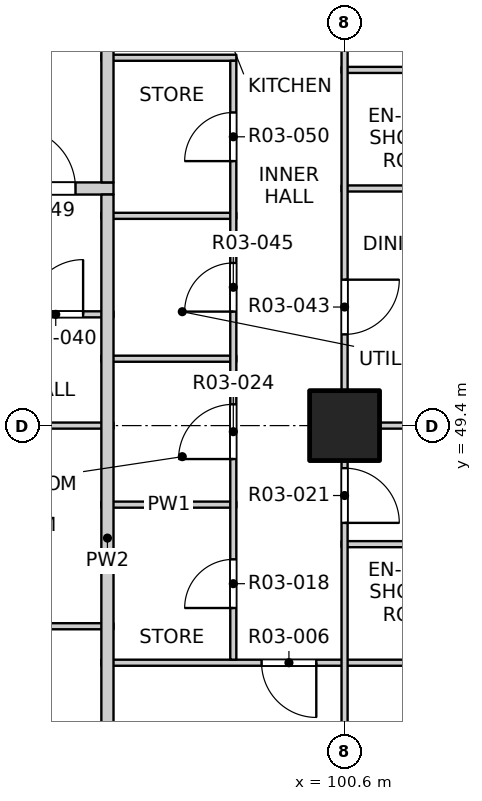
"""IFC4 building model, lengths in metres.
Left out: names, types, materials, properties, quantities, classifications, styles, units other than length and angle.
Written with IfcOpenShell. Run it as: python <this file> out.ifc"""

import sys

from ifc_helpers import new_model, si_unit, direction, frame, frame_2d, origin, origin_2d, place, context, subcontext, project, spatial, rectangle, extrude, element, fill, save


model = new_model("IFC4")
c1 = context("Model", 3, precision=1e-05, world=origin(), true_north=direction((0.0, 1.0)))
c2 = subcontext(c1, "Body", "Model", "MODEL_VIEW")
j1 = project(units=[si_unit("LENGTHUNIT", "METRE"), si_unit("PLANEANGLEUNIT", "RADIAN")], contexts=[c1])
p1 = place(None, origin())
s1 = spatial("IfcSite", under=j1, at=p1, CompositionType="ELEMENT")
p2 = place(p1, origin())
s2 = spatial("IfcBuilding", under=s1, at=p2, CompositionType="ELEMENT")
p3 = place(p2, frame((0.0, 0.0, 43.3)))
s3 = spatial("IfcBuildingStorey", under=s2, at=p3, CompositionType="ELEMENT", Elevation=43.3)
p4 = place(p3, frame((100.6, 49.4, -0.25), z_axis=(0.0, 0.0, 1.0), x_axis=(1.0, 0.0, 0.0)))
e1 = element("IfcColumn", 1, at=p4, inside=s3, PredefinedType="COLUMN", context=c2, shape_type="SweptSolid", body=[
    extrude(rectangle(XDim=1.15, YDim=1.15, at=origin_2d()), origin(), (0.0, 0.0, 1.0), 3.35),
])
p5 = place(p3, frame((96.6, 45.5, 0.0), z_axis=(0.0, 0.0, 1.0), x_axis=(1.0, 0.0, 0.0)))
e2 = element("IfcWall", 2, at=p5, inside=s3, PredefinedType="PARTITIONING", context=c2, shape_type="SweptSolid", body=[
    extrude(rectangle(XDim=11.5, YDim=0.1, at=frame_2d((5.75, 0.0))), origin(), (0.0, 0.0, 1.0), 3.1),
])
p6 = place(p5, frame((2.635, 0.0, 0.0)))
e3 = element("IfcOpeningElement", 3, at=p6, cuts=e2, PredefinedType="OPENING", context=c2, shape_type="SweptSolid", body=[
    extrude(rectangle(XDim=0.9, YDim=2.1, at=frame_2d((0.45, 1.05))), frame((0.0, 0.06, 0.0), z_axis=(0.0, -1.0, 0.0), x_axis=(1.0, 0.0, 0.0)), (0.0, 0.0, 1.0), 0.12),
])
p7 = place(p3, frame((88.8, 46.1, 0.0), z_axis=(0.0, 0.0, 1.0), x_axis=(1.0, 0.0, 0.0)))
e4 = element("IfcWall", 4, at=p7, inside=s3, PredefinedType="PARTITIONING", context=c2, shape_type="SweptSolid", body=[
    extrude(rectangle(XDim=8.0, YDim=0.1, at=frame_2d((4.0, 0.0))), origin(), (0.0, 0.0, 1.0), 3.1),
])
p8 = place(p7, frame((0.625, 0.0, 0.0)))
e5 = element("IfcOpeningElement", 5, at=p8, cuts=e4, PredefinedType="OPENING", context=c2, shape_type="SweptSolid", body=[
    extrude(rectangle(XDim=0.9, YDim=2.1, at=frame_2d((0.45, 1.05))), frame((0.0, 0.06, 0.0), z_axis=(0.0, -1.0, 0.0), x_axis=(1.0, 0.0, 0.0)), (0.0, 0.0, 1.0), 0.12),
])
p9 = place(p7, frame((2.575, 0.0, 0.0)))
e6 = element("IfcOpeningElement", 6, at=p9, cuts=e4, PredefinedType="OPENING", context=c2, shape_type="SweptSolid", body=[
    extrude(rectangle(XDim=0.9, YDim=2.1, at=frame_2d((0.45, 1.05))), frame((0.0, 0.06, 0.0), z_axis=(0.0, -1.0, 0.0), x_axis=(1.0, 0.0, 0.0)), (0.0, 0.0, 1.0), 0.12),
])
p10 = place(p7, frame((5.35, 0.0, 0.0)))
e7 = element("IfcOpeningElement", 7, at=p10, cuts=e4, PredefinedType="OPENING", context=c2, shape_type="SweptSolid", body=[
    extrude(rectangle(XDim=1.2, YDim=2.1, at=frame_2d((0.6, 1.05))), frame((0.0, 0.06, 0.0), z_axis=(0.0, -1.0, 0.0), x_axis=(1.0, 0.0, 0.0)), (0.0, 0.0, 1.0), 0.12),
])
p11 = place(p3, frame((100.55, 47.45, 0.0), z_axis=(0.0, 0.0, 1.0), x_axis=(1.0, 0.0, 0.0)))
e8 = element("IfcWall", 8, at=p11, inside=s3, PredefinedType="PARTITIONING", context=c2, shape_type="SweptSolid", body=[
    extrude(rectangle(XDim=3.55, YDim=0.1, at=frame_2d((1.775, 0.0))), origin(), (0.0, 0.0, 1.0), 3.1),
])
p12 = place(p3, frame((96.6, 48.1, 0.0), z_axis=(0.0, 0.0, 1.0), x_axis=(1.0, 0.0, 0.0)))
e9 = element("IfcWall", 9, at=p12, inside=s3, PredefinedType="PARTITIONING", context=c2, shape_type="SweptSolid", body=[
    extrude(rectangle(XDim=2.22, YDim=0.1, at=frame_2d((1.11, 0.0))), origin(), (0.0, 0.0, 1.0), 3.1),
])
p13 = place(p3, frame((73.2, 49.4, 0.0), z_axis=(0.0, 0.0, 1.0), x_axis=(1.0, 0.0, 0.0)))
e10 = element("IfcWall", 10, at=p13, inside=s3, PredefinedType="PARTITIONING", context=c2, shape_type="SweptSolid", body=[
    extrude(rectangle(XDim=23.6, YDim=0.1, at=frame_2d((11.8, 0.0))), origin(), (0.0, 0.0, 1.0), 3.1),
])
p14 = place(p13, frame((1.6, 0.0, 0.0)))
e11 = element("IfcOpeningElement", 11, at=p14, cuts=e10, PredefinedType="OPENING", context=c2, shape_type="SweptSolid", body=[
    extrude(rectangle(XDim=0.9, YDim=2.1, at=frame_2d((0.45, 1.05))), frame((0.0, 0.06, 0.0), z_axis=(0.0, -1.0, 0.0), x_axis=(1.0, 0.0, 0.0)), (0.0, 0.0, 1.0), 0.12),
])
p15 = place(p13, frame((6.475, 0.0, 0.0)))
e12 = element("IfcOpeningElement", 12, at=p15, cuts=e10, PredefinedType="OPENING", context=c2, shape_type="SweptSolid", body=[
    extrude(rectangle(XDim=0.9, YDim=2.1, at=frame_2d((0.45, 1.05))), frame((0.0, 0.06, 0.0), z_axis=(0.0, -1.0, 0.0), x_axis=(1.0, 0.0, 0.0)), (0.0, 0.0, 1.0), 0.12),
])
p16 = place(p13, frame((9.4, 0.0, 0.0)))
e13 = element("IfcOpeningElement", 13, at=p16, cuts=e10, PredefinedType="OPENING", context=c2, shape_type="SweptSolid", body=[
    extrude(rectangle(XDim=0.9, YDim=2.1, at=frame_2d((0.45, 1.05))), frame((0.0, 0.06, 0.0), z_axis=(0.0, -1.0, 0.0), x_axis=(1.0, 0.0, 0.0)), (0.0, 0.0, 1.0), 0.12),
])
p17 = place(p13, frame((14.275, 0.0, 0.0)))
e14 = element("IfcOpeningElement", 14, at=p17, cuts=e10, PredefinedType="OPENING", context=c2, shape_type="SweptSolid", body=[
    extrude(rectangle(XDim=0.9, YDim=2.1, at=frame_2d((0.45, 1.05))), frame((0.0, 0.06, 0.0), z_axis=(0.0, -1.0, 0.0), x_axis=(1.0, 0.0, 0.0)), (0.0, 0.0, 1.0), 0.12),
])
p18 = place(p13, frame((18.0, 0.0, 0.0)))
e15 = element("IfcOpeningElement", 15, at=p18, cuts=e10, PredefinedType="OPENING", context=c2, shape_type="SweptSolid", body=[
    extrude(rectangle(XDim=0.9, YDim=2.1, at=frame_2d((0.45, 1.05))), frame((0.0, 0.06, 0.0), z_axis=(0.0, -1.0, 0.0), x_axis=(1.0, 0.0, 0.0)), (0.0, 0.0, 1.0), 0.12),
])
p19 = place(p13, frame((21.1, 0.0, 0.0)))
e16 = element("IfcOpeningElement", 16, at=p19, cuts=e10, PredefinedType="OPENING", context=c2, shape_type="SweptSolid", body=[
    extrude(rectangle(XDim=0.9, YDim=2.1, at=frame_2d((0.45, 1.05))), frame((0.0, 0.06, 0.0), z_axis=(0.0, -1.0, 0.0), x_axis=(1.0, 0.0, 0.0)), (0.0, 0.0, 1.0), 0.12),
])
p20 = place(p3, frame((100.55, 49.4, 0.0), z_axis=(0.0, 0.0, 1.0), x_axis=(1.0, 0.0, 0.0)))
e17 = element("IfcWall", 17, at=p20, inside=s3, PredefinedType="PARTITIONING", context=c2, shape_type="SweptSolid", body=[
    extrude(rectangle(XDim=7.55, YDim=0.1, at=frame_2d((3.775, 0.0))), origin(), (0.0, 0.0, 1.0), 3.1),
])
p21 = place(p3, frame((96.6, 50.5, 0.0), z_axis=(0.0, 0.0, 1.0), x_axis=(1.0, 0.0, 0.0)))
e18 = element("IfcWall", 18, at=p21, inside=s3, PredefinedType="PARTITIONING", context=c2, shape_type="SweptSolid", body=[
    extrude(rectangle(XDim=2.22, YDim=0.1, at=frame_2d((1.11, 0.0))), origin(), (0.0, 0.0, 1.0), 3.1),
])
p22 = place(p3, frame((94.95, 51.23, 0.0), z_axis=(0.0, 0.0, 1.0), x_axis=(1.0, 0.0, 0.0)))
e19 = element("IfcWall", 19, at=p22, inside=s3, PredefinedType="PARTITIONING", context=c2, shape_type="SweptSolid", body=[
    extrude(rectangle(XDim=1.85, YDim=0.1, at=frame_2d((0.925, 0.0))), origin(), (0.0, 0.0, 1.0), 3.1),
])
p23 = place(p22, frame((0.45, 0.0, 0.0)))
e20 = element("IfcOpeningElement", 20, at=p23, cuts=e19, PredefinedType="OPENING", context=c2, shape_type="SweptSolid", body=[
    extrude(rectangle(XDim=0.9, YDim=2.1, at=frame_2d((0.45, 1.05))), frame((0.0, 0.06, 0.0), z_axis=(0.0, -1.0, 0.0), x_axis=(1.0, 0.0, 0.0)), (0.0, 0.0, 1.0), 0.12),
])
p24 = place(p3, frame((96.6, 52.85, 0.0), z_axis=(0.0, 0.0, 1.0), x_axis=(1.0, 0.0, 0.0)))
e21 = element("IfcWall", 21, at=p24, inside=s3, PredefinedType="PARTITIONING", context=c2, shape_type="SweptSolid", body=[
    extrude(rectangle(XDim=2.22, YDim=0.1, at=frame_2d((1.11, 0.0))), origin(), (0.0, 0.0, 1.0), 3.1),
])
p25 = place(p3, frame((73.2, 53.3, 0.0), z_axis=(0.0, 0.0, 1.0), x_axis=(1.0, 0.0, 0.0)))
e22 = element("IfcWall", 22, at=p25, inside=s3, PredefinedType="PARTITIONING", context=c2, shape_type="SweptSolid", body=[
    extrude(rectangle(XDim=23.6, YDim=0.2, at=frame_2d((11.8, 0.0))), origin(), (0.0, 0.0, 1.0), 3.1),
])
p26 = place(p25, frame((2.825, 0.0, 0.0)))
e23 = element("IfcOpeningElement", 23, at=p26, cuts=e22, PredefinedType="OPENING", context=c2, shape_type="SweptSolid", body=[
    extrude(rectangle(XDim=1.0, YDim=2.1, at=frame_2d((0.5, 1.05))), frame((0.0, 0.11, 0.0), z_axis=(0.0, -1.0, 0.0), x_axis=(1.0, 0.0, 0.0)), (0.0, 0.0, 1.0), 0.22),
])
p27 = place(p25, frame((14.025, 0.0, 0.0)))
e24 = element("IfcOpeningElement", 24, at=p27, cuts=e22, PredefinedType="OPENING", context=c2, shape_type="SweptSolid", body=[
    extrude(rectangle(XDim=1.0, YDim=2.1, at=frame_2d((0.5, 1.05))), frame((0.0, 0.11, 0.0), z_axis=(0.0, -1.0, 0.0), x_axis=(1.0, 0.0, 0.0)), (0.0, 0.0, 1.0), 0.22),
])
p28 = place(p25, frame((21.975, 0.0, 0.0)))
e25 = element("IfcOpeningElement", 25, at=p28, cuts=e22, PredefinedType="OPENING", context=c2, shape_type="SweptSolid", body=[
    extrude(rectangle(XDim=1.0, YDim=2.1, at=frame_2d((0.5, 1.05))), frame((0.0, 0.11, 0.0), z_axis=(0.0, -1.0, 0.0), x_axis=(1.0, 0.0, 0.0)), (0.0, 0.0, 1.0), 0.22),
])
p29 = place(p3, frame((100.55, 53.3, 0.0), z_axis=(0.0, 0.0, 1.0), x_axis=(1.0, 0.0, 0.0)))
e26 = element("IfcWall", 26, at=p29, inside=s3, PredefinedType="PARTITIONING", context=c2, shape_type="SweptSolid", body=[
    extrude(rectangle(XDim=7.55, YDim=0.1, at=frame_2d((3.775, 0.0))), origin(), (0.0, 0.0, 1.0), 3.1),
])
p30 = place(p3, frame((100.55, 55.25, 0.0), z_axis=(0.0, 0.0, 1.0), x_axis=(1.0, 0.0, 0.0)))
e27 = element("IfcWall", 27, at=p30, inside=s3, PredefinedType="PARTITIONING", context=c2, shape_type="SweptSolid", body=[
    extrude(rectangle(XDim=3.55, YDim=0.1, at=frame_2d((1.775, 0.0))), origin(), (0.0, 0.0, 1.0), 3.1),
])
p31 = place(p3, frame((96.6, 55.45, 0.0), z_axis=(0.0, 0.0, 1.0), x_axis=(1.0, 0.0, 0.0)))
e28 = element("IfcWall", 28, at=p31, inside=s3, PredefinedType="PARTITIONING", context=c2, shape_type="SweptSolid", body=[
    extrude(rectangle(XDim=2.22, YDim=0.1, at=frame_2d((1.11, 0.0))), origin(), (0.0, 0.0, 1.0), 3.1),
])
p32 = place(p3, frame((96.7, 41.9, 0.0), z_axis=(0.0, 0.0, 1.0), x_axis=(0.0, 1.0, 0.0)))
e29 = element("IfcWall", 29, at=p32, inside=s3, PredefinedType="PARTITIONING", context=c2, shape_type="SweptSolid", body=[
    extrude(rectangle(XDim=11.3, YDim=0.2, at=frame_2d((5.65, 0.0))), origin(), (0.0, 0.0, 1.0), 3.1),
])
p33 = place(p3, frame((96.7, 53.4, 0.0), z_axis=(0.0, 0.0, 1.0), x_axis=(0.0, 1.0, 0.0)))
e30 = element("IfcWall", 30, at=p33, inside=s3, PredefinedType="PARTITIONING", context=c2, shape_type="SweptSolid", body=[
    extrude(rectangle(XDim=31.0, YDim=0.2, at=frame_2d((15.5, 0.0))), origin(), (0.0, 0.0, 1.0), 3.1),
])
p34 = place(p33, frame((3.325, 0.0, 0.0)))
e31 = element("IfcOpeningElement", 31, at=p34, cuts=e30, PredefinedType="OPENING", context=c2, shape_type="SweptSolid", body=[
    extrude(rectangle(XDim=1.0, YDim=2.1, at=frame_2d((0.5, 1.05))), frame((0.0, 0.11, 0.0), z_axis=(0.0, -1.0, 0.0), x_axis=(1.0, 0.0, 0.0)), (0.0, 0.0, 1.0), 0.22),
])
p35 = place(p33, frame((11.125, 0.0, 0.0)))
e32 = element("IfcOpeningElement", 32, at=p35, cuts=e30, PredefinedType="OPENING", context=c2, shape_type="SweptSolid", body=[
    extrude(rectangle(XDim=1.0, YDim=2.1, at=frame_2d((0.5, 1.05))), frame((0.0, 0.11, 0.0), z_axis=(0.0, -1.0, 0.0), x_axis=(1.0, 0.0, 0.0)), (0.0, 0.0, 1.0), 0.22),
])
p36 = place(p33, frame((26.875, 0.0, 0.0)))
e33 = element("IfcOpeningElement", 33, at=p36, cuts=e30, PredefinedType="OPENING", context=c2, shape_type="SweptSolid", body=[
    extrude(rectangle(XDim=1.0, YDim=2.1, at=frame_2d((0.5, 1.05))), frame((0.0, 0.11, 0.0), z_axis=(0.0, -1.0, 0.0), x_axis=(1.0, 0.0, 0.0)), (0.0, 0.0, 1.0), 0.22),
])
p37 = place(p3, frame((98.77, 45.55, 0.0), z_axis=(0.0, 0.0, 1.0), x_axis=(0.0, 1.0, 0.0)))
e34 = element("IfcWall", 34, at=p37, inside=s3, PredefinedType="PARTITIONING", context=c2, shape_type="SweptSolid", body=[
    extrude(rectangle(XDim=9.85, YDim=0.1, at=frame_2d((4.925, 0.0))), origin(), (0.0, 0.0, 1.0), 3.1),
])
p38 = place(p37, frame((0.85, 0.0, 0.0)))
e35 = element("IfcOpeningElement", 35, at=p38, cuts=e34, PredefinedType="OPENING", context=c2, shape_type="SweptSolid", body=[
    extrude(rectangle(XDim=0.8, YDim=2.1, at=frame_2d((0.4, 1.05))), frame((0.0, 0.06, 0.0), z_axis=(0.0, -1.0, 0.0), x_axis=(1.0, 0.0, 0.0)), (0.0, 0.0, 1.0), 0.12),
])
p39 = place(p37, frame((3.3, 0.0, 0.0)))
e36 = element("IfcOpeningElement", 36, at=p39, cuts=e34, PredefinedType="OPENING", context=c2, shape_type="SweptSolid", body=[
    extrude(rectangle(XDim=0.9, YDim=2.1, at=frame_2d((0.45, 1.05))), frame((0.0, 0.06, 0.0), z_axis=(0.0, -1.0, 0.0), x_axis=(1.0, 0.0, 0.0)), (0.0, 0.0, 1.0), 0.12),
])
p40 = place(p37, frame((5.725, 0.0, 0.0)))
e37 = element("IfcOpeningElement", 37, at=p40, cuts=e34, PredefinedType="OPENING", context=c2, shape_type="SweptSolid", body=[
    extrude(rectangle(XDim=0.8, YDim=2.1, at=frame_2d((0.4, 1.05))), frame((0.0, 0.06, 0.0), z_axis=(0.0, -1.0, 0.0), x_axis=(1.0, 0.0, 0.0)), (0.0, 0.0, 1.0), 0.12),
])
p41 = place(p37, frame((8.2, 0.0, 0.0)))
e38 = element("IfcOpeningElement", 38, at=p41, cuts=e34, PredefinedType="OPENING", context=c2, shape_type="SweptSolid", body=[
    extrude(rectangle(XDim=0.8, YDim=2.1, at=frame_2d((0.4, 1.05))), frame((0.0, 0.06, 0.0), z_axis=(0.0, -1.0, 0.0), x_axis=(1.0, 0.0, 0.0)), (0.0, 0.0, 1.0), 0.12),
])
p42 = place(p3, frame((100.6, 41.9, 0.0), z_axis=(0.0, 0.0, 1.0), x_axis=(0.0, 1.0, 0.0)))
e39 = element("IfcWall", 39, at=p42, inside=s3, PredefinedType="PARTITIONING", context=c2, shape_type="SweptSolid", body=[
    extrude(rectangle(XDim=46.2, YDim=0.1, at=frame_2d((23.1, 0.0))), origin(), (0.0, 0.0, 1.0), 3.1),
])
p43 = place(p42, frame((1.2, 0.0, 0.0)))
e40 = element("IfcOpeningElement", 40, at=p43, cuts=e39, PredefinedType="OPENING", context=c2, shape_type="SweptSolid", body=[
    extrude(rectangle(XDim=0.9, YDim=2.1, at=frame_2d((0.45, 1.05))), frame((0.0, 0.06, 0.0), z_axis=(0.0, -1.0, 0.0), x_axis=(1.0, 0.0, 0.0)), (0.0, 0.0, 1.0), 0.12),
])
p44 = place(p42, frame((5.9, 0.0, 0.0)))
e41 = element("IfcOpeningElement", 41, at=p44, cuts=e39, PredefinedType="OPENING", context=c2, shape_type="SweptSolid", body=[
    extrude(rectangle(XDim=0.9, YDim=2.1, at=frame_2d((0.45, 1.05))), frame((0.0, 0.06, 0.0), z_axis=(0.0, -1.0, 0.0), x_axis=(1.0, 0.0, 0.0)), (0.0, 0.0, 1.0), 0.12),
])
p45 = place(p42, frame((9.0, 0.0, 0.0)))
e42 = element("IfcOpeningElement", 42, at=p45, cuts=e39, PredefinedType="OPENING", context=c2, shape_type="SweptSolid", body=[
    extrude(rectangle(XDim=0.9, YDim=2.1, at=frame_2d((0.45, 1.05))), frame((0.0, 0.06, 0.0), z_axis=(0.0, -1.0, 0.0), x_axis=(1.0, 0.0, 0.0)), (0.0, 0.0, 1.0), 0.12),
])
p46 = place(p42, frame((13.725, 0.0, 0.0)))
e43 = element("IfcOpeningElement", 43, at=p46, cuts=e39, PredefinedType="OPENING", context=c2, shape_type="SweptSolid", body=[
    extrude(rectangle(XDim=0.9, YDim=2.1, at=frame_2d((0.45, 1.05))), frame((0.0, 0.06, 0.0), z_axis=(0.0, -1.0, 0.0), x_axis=(1.0, 0.0, 0.0)), (0.0, 0.0, 1.0), 0.12),
])
p47 = place(p42, frame((17.775, 0.0, 0.0)))
e44 = element("IfcOpeningElement", 44, at=p47, cuts=e39, PredefinedType="OPENING", context=c2, shape_type="SweptSolid", body=[
    extrude(rectangle(XDim=0.9, YDim=2.1, at=frame_2d((0.45, 1.05))), frame((0.0, 0.06, 0.0), z_axis=(0.0, -1.0, 0.0), x_axis=(1.0, 0.0, 0.0)), (0.0, 0.0, 1.0), 0.12),
])
p48 = place(p42, frame((21.5, 0.0, 0.0)))
e45 = element("IfcOpeningElement", 45, at=p48, cuts=e39, PredefinedType="OPENING", context=c2, shape_type="SweptSolid", body=[
    extrude(rectangle(XDim=0.9, YDim=2.1, at=frame_2d((0.45, 1.05))), frame((0.0, 0.06, 0.0), z_axis=(0.0, -1.0, 0.0), x_axis=(1.0, 0.0, 0.0)), (0.0, 0.0, 1.0), 0.12),
])
p49 = place(p42, frame((24.6, 0.0, 0.0)))
e46 = element("IfcOpeningElement", 46, at=p49, cuts=e39, PredefinedType="OPENING", context=c2, shape_type="SweptSolid", body=[
    extrude(rectangle(XDim=0.9, YDim=2.1, at=frame_2d((0.45, 1.05))), frame((0.0, 0.06, 0.0), z_axis=(0.0, -1.0, 0.0), x_axis=(1.0, 0.0, 0.0)), (0.0, 0.0, 1.0), 0.12),
])
p50 = place(p42, frame((28.5, 0.0, 0.0)))
e47 = element("IfcOpeningElement", 47, at=p50, cuts=e39, PredefinedType="OPENING", context=c2, shape_type="SweptSolid", body=[
    extrude(rectangle(XDim=0.9, YDim=2.1, at=frame_2d((0.45, 1.05))), frame((0.0, 0.06, 0.0), z_axis=(0.0, -1.0, 0.0), x_axis=(1.0, 0.0, 0.0)), (0.0, 0.0, 1.0), 0.12),
])
p51 = place(p42, frame((33.375, 0.0, 0.0)))
e48 = element("IfcOpeningElement", 48, at=p51, cuts=e39, PredefinedType="OPENING", context=c2, shape_type="SweptSolid", body=[
    extrude(rectangle(XDim=0.9, YDim=2.1, at=frame_2d((0.45, 1.05))), frame((0.0, 0.06, 0.0), z_axis=(0.0, -1.0, 0.0), x_axis=(1.0, 0.0, 0.0)), (0.0, 0.0, 1.0), 0.12),
])
p52 = place(p42, frame((37.1, 0.0, 0.0)))
e49 = element("IfcOpeningElement", 49, at=p52, cuts=e39, PredefinedType="OPENING", context=c2, shape_type="SweptSolid", body=[
    extrude(rectangle(XDim=0.9, YDim=2.1, at=frame_2d((0.45, 1.05))), frame((0.0, 0.06, 0.0), z_axis=(0.0, -1.0, 0.0), x_axis=(1.0, 0.0, 0.0)), (0.0, 0.0, 1.0), 0.12),
])
p53 = place(p42, frame((40.2, 0.0, 0.0)))
e50 = element("IfcOpeningElement", 50, at=p53, cuts=e39, PredefinedType="OPENING", context=c2, shape_type="SweptSolid", body=[
    extrude(rectangle(XDim=0.9, YDim=2.1, at=frame_2d((0.45, 1.05))), frame((0.0, 0.06, 0.0), z_axis=(0.0, -1.0, 0.0), x_axis=(1.0, 0.0, 0.0)), (0.0, 0.0, 1.0), 0.12),
])
p54 = place(p42, frame((44.1, 0.0, 0.0)))
e51 = element("IfcOpeningElement", 51, at=p54, cuts=e39, PredefinedType="OPENING", context=c2, shape_type="SweptSolid", body=[
    extrude(rectangle(XDim=0.9, YDim=2.1, at=frame_2d((0.45, 1.05))), frame((0.0, 0.06, 0.0), z_axis=(0.0, -1.0, 0.0), x_axis=(1.0, 0.0, 0.0)), (0.0, 0.0, 1.0), 0.12),
])
p55 = place(p6, origin())
e52 = element("IfcDoor", 52, at=p55, inside=s3, OperationType="SINGLE_SWING_LEFT", PredefinedType="DOOR", context=c2, shape_type="SweptSolid", body=[
    extrude(rectangle(XDim=0.9, YDim=2.1, at=frame_2d((0.45, 1.05))), frame((0.0, 0.025, 0.0), z_axis=(0.0, -1.0, 0.0), x_axis=(1.0, 0.0, 0.0)), (0.0, 0.0, 1.0), 0.05),
])
fill(e3, e52)
p56 = place(p38, origin())
e53 = element("IfcDoor", 53, at=p56, inside=s3, OperationType="SINGLE_SWING_LEFT", PredefinedType="DOOR", context=c2, shape_type="SweptSolid", body=[
    extrude(rectangle(XDim=0.8, YDim=2.1, at=frame_2d((0.4, 1.05))), frame((0.0, 0.025, 0.0), z_axis=(0.0, -1.0, 0.0), x_axis=(1.0, 0.0, 0.0)), (0.0, 0.0, 1.0), 0.05),
])
fill(e35, e53)
p57 = place(p44, origin())
e54 = element("IfcDoor", 54, at=p57, inside=s3, OperationType="SINGLE_SWING_RIGHT", PredefinedType="DOOR", context=c2, shape_type="SweptSolid", body=[
    extrude(rectangle(XDim=0.9, YDim=2.1, at=frame_2d((0.45, 1.05))), frame((0.0, 0.025, 0.0), z_axis=(0.0, -1.0, 0.0), x_axis=(1.0, 0.0, 0.0)), (0.0, 0.0, 1.0), 0.05),
])
fill(e41, e54)
p58 = place(p39, origin())
e55 = element("IfcDoor", 55, at=p58, inside=s3, OperationType="SINGLE_SWING_LEFT", PredefinedType="DOOR", context=c2, shape_type="SweptSolid", body=[
    extrude(rectangle(XDim=0.9, YDim=2.1, at=frame_2d((0.45, 1.05))), frame((0.0, 0.025, 0.0), z_axis=(0.0, -1.0, 0.0), x_axis=(1.0, 0.0, 0.0)), (0.0, 0.0, 1.0), 0.05),
])
fill(e36, e55)
p59 = place(p23, origin())
e56 = element("IfcDoor", 56, at=p59, inside=s3, OperationType="SINGLE_SWING_RIGHT", PredefinedType="DOOR", context=c2, shape_type="SweptSolid", body=[
    extrude(rectangle(XDim=0.9, YDim=2.1, at=frame_2d((0.45, 1.05))), frame((0.0, 0.025, 0.0), z_axis=(0.0, -1.0, 0.0), x_axis=(1.0, 0.0, 0.0)), (0.0, 0.0, 1.0), 0.05),
])
fill(e20, e56)
p60 = place(p45, origin())
e57 = element("IfcDoor", 57, at=p60, inside=s3, OperationType="SINGLE_SWING_LEFT", PredefinedType="DOOR", context=c2, shape_type="SweptSolid", body=[
    extrude(rectangle(XDim=0.9, YDim=2.1, at=frame_2d((0.45, 1.05))), frame((0.0, 0.025, 0.0), z_axis=(0.0, -1.0, 0.0), x_axis=(1.0, 0.0, 0.0)), (0.0, 0.0, 1.0), 0.05),
])
fill(e42, e57)
p61 = place(p40, origin())
e58 = element("IfcDoor", 58, at=p61, inside=s3, OperationType="SINGLE_SWING_LEFT", PredefinedType="DOOR", context=c2, shape_type="SweptSolid", body=[
    extrude(rectangle(XDim=0.8, YDim=2.1, at=frame_2d((0.4, 1.05))), frame((0.0, 0.025, 0.0), z_axis=(0.0, -1.0, 0.0), x_axis=(1.0, 0.0, 0.0)), (0.0, 0.0, 1.0), 0.05),
])
fill(e37, e58)
p62 = place(p28, origin())
e59 = element("IfcDoor", 59, at=p62, inside=s3, OperationType="SINGLE_SWING_LEFT", PredefinedType="DOOR", context=c2, shape_type="SweptSolid", body=[
    extrude(rectangle(XDim=1.0, YDim=2.1, at=frame_2d((0.5, 1.05))), frame((0.0, 0.025, 0.0), z_axis=(0.0, -1.0, 0.0), x_axis=(1.0, 0.0, 0.0)), (0.0, 0.0, 1.0), 0.05),
])
fill(e25, e59)
p63 = place(p41, origin())
e60 = element("IfcDoor", 60, at=p63, inside=s3, OperationType="SINGLE_SWING_LEFT", PredefinedType="DOOR", context=c2, shape_type="SweptSolid", body=[
    extrude(rectangle(XDim=0.8, YDim=2.1, at=frame_2d((0.4, 1.05))), frame((0.0, 0.025, 0.0), z_axis=(0.0, -1.0, 0.0), x_axis=(1.0, 0.0, 0.0)), (0.0, 0.0, 1.0), 0.05),
])
fill(e38, e60)
save(model, sys.argv[1])
